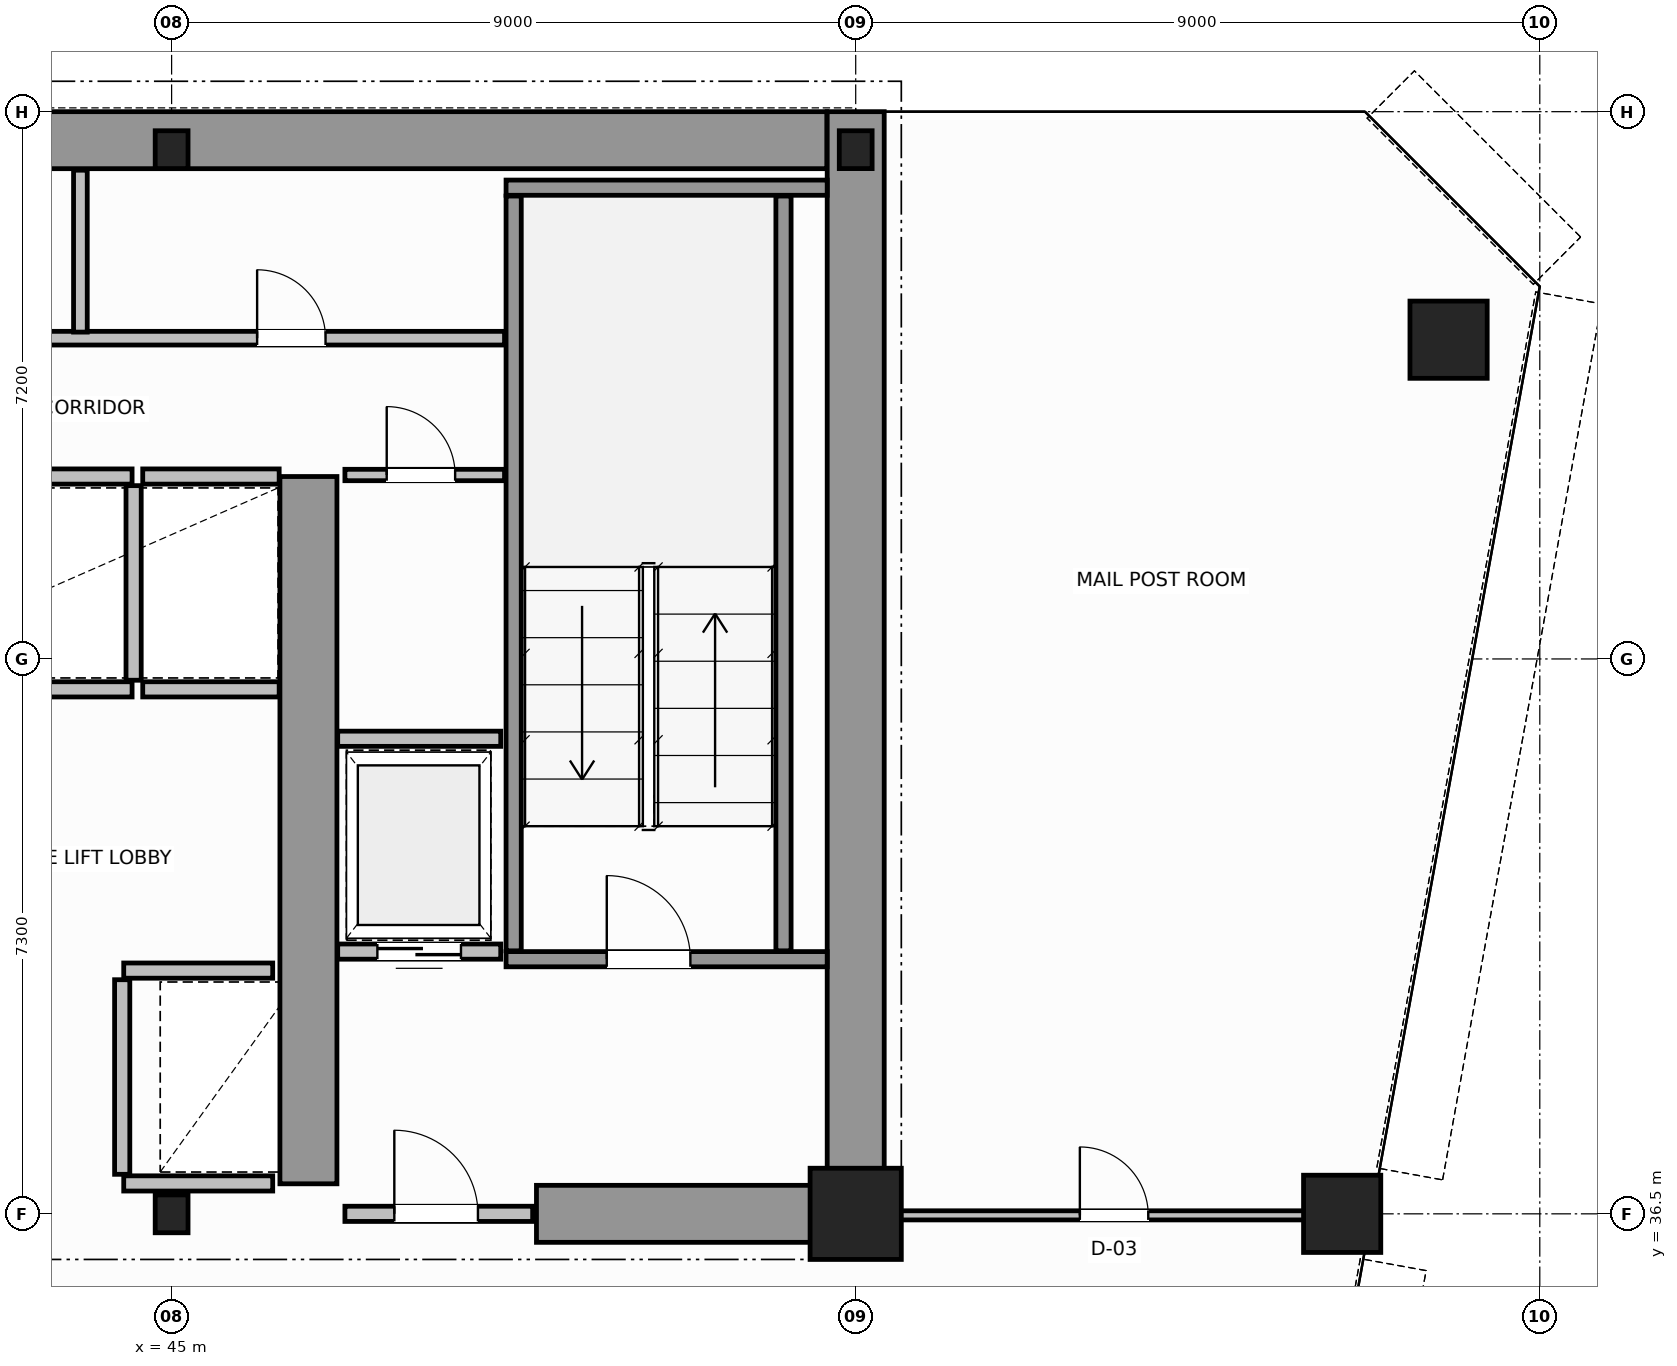
"""IFC4 building model, lengths in metres.
Left out: names, types, materials, properties, quantities, classifications, styles, units other than length and angle.
Written with IfcOpenShell. Run it as: python <this file> out.ifc"""

import sys

from ifc_helpers import new_model, si_unit, direction, frame, frame_2d, origin, origin_2d, place, context, subcontext, project, spatial, rectangle, hollow_circle, i_section, extrude, source, transform, mapped, element, fill, save


model = new_model("IFC4")
c1 = context("Model", 3, precision=1e-05, world=origin(), true_north=direction((0.0, 1.0)))
c2 = subcontext(c1, "Body", "Model", "MODEL_VIEW")
j1 = project(units=[si_unit("LENGTHUNIT", "METRE"), si_unit("PLANEANGLEUNIT", "RADIAN")], contexts=[c1])
p1 = place(None, origin())
s1 = spatial("IfcSite", under=j1, at=p1, CompositionType="ELEMENT")
p2 = place(p1, origin())
s2 = spatial("IfcBuilding", under=s1, at=p2, CompositionType="ELEMENT")
p3 = place(p2, frame((0.0, 0.0, 141.4)))
s3 = spatial("IfcBuildingStorey", under=s2, at=p3, CompositionType="ELEMENT", Elevation=141.4)
m1 = source(origin(), c2, "Body", "SweptSolid", [
    extrude(i_section(OverallWidth=0.432, OverallDepth=0.498, WebThickness=0.055, FlangeThickness=0.068, FilletRadius=0.015, at=origin_2d()), origin(), (0.0, 0.0, 1.0), 3.8),
])
p4 = place(p3, frame((45.0, 36.5, 0.0), z_axis=(0.0, 0.0, 1.0), x_axis=(1.0, 0.0, 0.0)))
e1 = element("IfcColumn", 1, at=p4, inside=s3, PredefinedType="COLUMN", context=c2, shape_type="MappedRepresentation", body=[
    mapped(m1, transform((0.0, 0.0, 0.0), scale=1.0)),
])
m2 = source(origin(), c2, "Body", "SweptSolid", [
    extrude(rectangle(XDim=1.2, YDim=1.2, at=origin_2d()), origin(), (0.0, 0.0, 1.0), 3.8),
])
p5 = place(p3, frame((54.0, 36.5, 0.0), z_axis=(0.0, 0.0, 1.0), x_axis=(1.0, 0.0, 0.0)))
e2 = element("IfcColumn", 2, at=p5, inside=s3, PredefinedType="COLUMN", context=c2, shape_type="MappedRepresentation", body=[
    mapped(m2, transform((0.0, 0.0, 0.0), scale=1.0)),
])
for number, where, z_axis, x_axis in (
    (3, (45.0, 50.5, 0.0), (0.0, 0.0, 1.0), (1.0, 0.0, 0.0)),
    (4, (54.0, 50.5, 0.0), (0.0, 0.0, 1.0), (1.0, 0.0, 0.0)),
):
    element("IfcColumn", number, at=place(p3, frame(where, z_axis=z_axis, x_axis=x_axis)), inside=s3, PredefinedType="COLUMN", context=c2, shape_type="MappedRepresentation", body=[
        mapped(m1, transform((0.0, 0.0, 0.0), scale=1.0)),
    ])
m3 = source(origin(), c2, "Body", "SweptSolid", [
    extrude(hollow_circle(Radius=0.508, WallThickness=0.045, at=origin_2d()), origin(), (0.0, 0.0, 1.0), 3.8),
])
for number, where, z_axis, x_axis in (
    (5, (61.8, 48.0, 0.0), (0.0, 0.0, 1.0), (1.0, 0.0, 0.0)),
    (6, (60.4, 36.5, 0.0), (0.0, 0.0, 1.0), (1.0, 0.0, 0.0)),
):
    element("IfcColumn", number, at=place(p3, frame(where, z_axis=z_axis, x_axis=x_axis)), inside=s3, PredefinedType="COLUMN", context=c2, shape_type="MappedRepresentation", body=[
        mapped(m3, transform((0.0, 0.0, 0.0), scale=1.0)),
    ])
p6 = place(p3, frame((34.002, 50.625, 0.0), z_axis=(0.0, 0.0, 1.0), x_axis=(1.0, 0.0, 0.0)))
e7 = element("IfcWall", 7, at=p6, inside=s3, PredefinedType="SHEAR", context=c2, shape_type="SweptSolid", body=[
    extrude(rectangle(XDim=19.619, YDim=0.75, at=frame_2d((9.81, 0.0))), origin(), (0.0, 0.0, 1.0), 3.8),
])
p7 = place(p3, frame((54.0, 36.5, 0.0), z_axis=(0.0, 0.0, 1.0), x_axis=(0.0, 1.0, 0.0)))
e8 = element("IfcWall", 8, at=p7, inside=s3, PredefinedType="SHEAR", context=c2, shape_type="SweptSolid", body=[
    extrude(rectangle(XDim=14.5, YDim=0.75, at=frame_2d((7.25, 0.0))), origin(), (0.0, 0.0, 1.0), 3.8),
])
p8 = place(p3, frame((49.8, 36.5, 0.0), z_axis=(0.0, 0.0, 1.0), x_axis=(1.0, 0.0, 0.0)))
e9 = element("IfcWall", 9, at=p8, inside=s3, PredefinedType="SHEAR", context=c2, shape_type="SweptSolid", body=[
    extrude(rectangle(XDim=3.805, YDim=0.75, at=frame_2d((1.902, 0.0))), origin(), (0.0, 0.0, 1.0), 2.38),
])
p9 = place(p3, frame((46.8, 36.895, 0.0), z_axis=(0.0, 0.0, 1.0), x_axis=(0.0, 1.0, 0.0)))
e10 = element("IfcWall", 10, at=p9, inside=s3, PredefinedType="SHEAR", context=c2, shape_type="SweptSolid", body=[
    extrude(rectangle(XDim=9.305, YDim=0.75, at=frame_2d((4.652, 0.0))), origin(), (0.0, 0.0, 1.0), 3.8),
])
p10 = place(p3, frame((49.4, 39.85, 0.0), z_axis=(0.0, 0.0, 1.0), x_axis=(1.0, 0.0, 0.0)))
e11 = element("IfcWall", 11, at=p10, inside=s3, PredefinedType="SOLIDWALL", context=c2, shape_type="SweptSolid", body=[
    extrude(rectangle(XDim=4.225, YDim=0.2, at=frame_2d((2.113, 0.0))), origin(), (0.0, 0.0, 1.0), 3.8),
])
p11 = place(p10, frame((1.325, 0.0, 0.0)))
e12 = element("IfcOpeningElement", 12, at=p11, cuts=e11, PredefinedType="OPENING", context=c2, shape_type="SweptSolid", body=[
    extrude(rectangle(XDim=1.1, YDim=2.15, at=frame_2d((0.55, 1.075))), frame((0.0, 0.11, 0.0), z_axis=(0.0, -1.0, 0.0), x_axis=(1.0, 0.0, 0.0)), (0.0, 0.0, 1.0), 0.22),
])
p12 = place(p3, frame((49.4, 50.0, 0.0), z_axis=(0.0, 0.0, 1.0), x_axis=(1.0, 0.0, 0.0)))
e13 = element("IfcWall", 13, at=p12, inside=s3, PredefinedType="SOLIDWALL", context=c2, shape_type="SweptSolid", body=[
    extrude(rectangle(XDim=4.225, YDim=0.2, at=frame_2d((2.113, 0.0))), origin(), (0.0, 0.0, 1.0), 3.8),
])
for number, where, z_axis, x_axis in (
    (14, (49.5, 39.96, 0.0), (0.0, 0.0, 1.0), (0.0, 1.0, 0.0)),
    (15, (53.05, 39.96, 0.0), (0.0, 0.0, 1.0), (0.0, 1.0, 0.0)),
):
    element("IfcWall", number, at=place(p3, frame(where, z_axis=z_axis, x_axis=x_axis)), inside=s3, PredefinedType="SOLIDWALL", context=c2, shape_type="SweptSolid", body=[
        extrude(rectangle(XDim=9.93, YDim=0.2, at=frame_2d((4.965, 0.0))), origin(), (0.0, 0.0, 1.0), 3.8),
    ])
p13 = place(p3, frame((47.28, 36.5, 0.0), z_axis=(0.0, 0.0, 1.0), x_axis=(1.0, 0.0, 0.0)))
e16 = element("IfcWall", 16, at=p13, inside=s3, PredefinedType="SOLIDWALL", context=c2, shape_type="SweptSolid", body=[
    extrude(rectangle(XDim=2.47, YDim=0.2, at=frame_2d((1.235, 0.0))), origin(), (0.0, 0.0, 1.0), 2.37),
])
p14 = place(p13, frame((0.65, 0.0, 0.0)))
e17 = element("IfcOpeningElement", 17, at=p14, cuts=e16, PredefinedType="OPENING", context=c2, shape_type="SweptSolid", body=[
    extrude(rectangle(XDim=1.1, YDim=2.15, at=frame_2d((0.55, 1.075))), frame((0.0, 0.11, 0.0), z_axis=(0.0, -1.0, 0.0), x_axis=(1.0, 0.0, 0.0)), (0.0, 0.0, 1.0), 0.22),
])
p15 = place(p3, frame((44.37, 39.7, 0.0), z_axis=(0.0, 0.0, 1.0), x_axis=(1.0, 0.0, 0.0)))
e18 = element("IfcWall", 18, at=p15, inside=s3, PredefinedType="SOLIDWALL", context=c2, shape_type="SweptSolid", body=[
    extrude(rectangle(XDim=1.96, YDim=0.2, at=frame_2d((0.98, 0.0))), origin(), (0.0, 0.0, 1.0), 3.58),
])
p16 = place(p3, frame((44.37, 36.9, 0.0), z_axis=(0.0, 0.0, 1.0), x_axis=(1.0, 0.0, 0.0)))
e19 = element("IfcWall", 19, at=p16, inside=s3, PredefinedType="SOLIDWALL", context=c2, shape_type="SweptSolid", body=[
    extrude(rectangle(XDim=1.96, YDim=0.2, at=frame_2d((0.98, 0.0))), origin(), (0.0, 0.0, 1.0), 2.37),
])
p17 = place(p3, frame((44.35, 37.02, 0.0), z_axis=(0.0, 0.0, 1.0), x_axis=(0.0, 1.0, 0.0)))
e20 = element("IfcWall", 20, at=p17, inside=s3, PredefinedType="SOLIDWALL", context=c2, shape_type="SweptSolid", body=[
    extrude(rectangle(XDim=2.56, YDim=0.2, at=frame_2d((1.28, 0.0))), origin(), (0.0, 0.0, 1.0), 3.58),
])
for number, where, z_axis, x_axis in (
    (21, (42.62, 43.4, 0.0), (0.0, 0.0, 1.0), (1.0, 0.0, 0.0)),
    (22, (42.62, 46.2, 0.0), (0.0, 0.0, 1.0), (1.0, 0.0, 0.0)),
):
    element("IfcWall", number, at=place(p3, frame(where, z_axis=z_axis, x_axis=x_axis)), inside=s3, PredefinedType="SOLIDWALL", context=c2, shape_type="SweptSolid", body=[
        extrude(rectangle(XDim=1.86, YDim=0.2, at=frame_2d((0.93, 0.0))), origin(), (0.0, 0.0, 1.0), 3.58),
    ])
p18 = place(p3, frame((44.5, 43.52, 0.0), z_axis=(0.0, 0.0, 1.0), x_axis=(0.0, 1.0, 0.0)))
e23 = element("IfcWall", 23, at=p18, inside=s3, PredefinedType="SOLIDWALL", context=c2, shape_type="SweptSolid", body=[
    extrude(rectangle(XDim=2.56, YDim=0.2, at=frame_2d((1.28, 0.0))), origin(), (0.0, 0.0, 1.0), 3.58),
])
for number, where, z_axis, x_axis in (
    (24, (44.62, 43.4, 0.0), (0.0, 0.0, 1.0), (1.0, 0.0, 0.0)),
    (25, (44.62, 46.2, 0.0), (0.0, 0.0, 1.0), (1.0, 0.0, 0.0)),
):
    element("IfcWall", number, at=place(p3, frame(where, z_axis=z_axis, x_axis=x_axis)), inside=s3, PredefinedType="SOLIDWALL", context=c2, shape_type="SweptSolid", body=[
        extrude(rectangle(XDim=1.795, YDim=0.2, at=frame_2d((0.897, 0.0))), origin(), (0.0, 0.0, 1.0), 3.58),
    ])
p19 = place(p3, frame((47.185, 39.95, 0.0), z_axis=(0.0, 0.0, 1.0), x_axis=(1.0, 0.0, 0.0)))
e26 = element("IfcWall", 26, at=p19, inside=s3, PredefinedType="SOLIDWALL", context=c2, shape_type="SweptSolid", body=[
    extrude(rectangle(XDim=2.145, YDim=0.2, at=frame_2d((1.073, 0.0))), origin(), (0.0, 0.0, 1.0), 3.58),
])
p20 = place(p19, frame((0.522, 0.0, 0.0)))
e27 = element("IfcOpeningElement", 27, at=p20, cuts=e26, PredefinedType="OPENING", context=c2, shape_type="SweptSolid", body=[
    extrude(rectangle(XDim=1.1, YDim=2.15, at=frame_2d((0.55, 1.075))), frame((0.0, 0.11, 0.0), z_axis=(0.0, -1.0, 0.0), x_axis=(1.0, 0.0, 0.0)), (0.0, 0.0, 1.0), 0.22),
])
p21 = place(p3, frame((47.185, 42.75, 0.0), z_axis=(0.0, 0.0, 1.0), x_axis=(1.0, 0.0, 0.0)))
e28 = element("IfcWall", 28, at=p21, inside=s3, PredefinedType="SOLIDWALL", context=c2, shape_type="SweptSolid", body=[
    extrude(rectangle(XDim=2.145, YDim=0.2, at=frame_2d((1.073, 0.0))), origin(), (0.0, 0.0, 1.0), 3.58),
])
p22 = place(p3, frame((47.28, 46.22, 0.0), z_axis=(0.0, 0.0, 1.0), x_axis=(1.0, 0.0, 0.0)))
e29 = element("IfcWall", 29, at=p22, inside=s3, PredefinedType="PARTITIONING", context=c2, shape_type="SweptSolid", body=[
    extrude(rectangle(XDim=2.1, YDim=0.15, at=frame_2d((1.05, 0.0))), origin(), (0.0, 0.0, 1.0), 3.58),
])
p23 = place(p22, frame((0.55, 0.0, 0.0)))
e30 = element("IfcOpeningElement", 30, at=p23, cuts=e29, PredefinedType="OPENING", context=c2, shape_type="SweptSolid", body=[
    extrude(rectangle(XDim=0.9, YDim=2.1, at=frame_2d((0.45, 1.05))), frame((0.0, 0.085, 0.0), z_axis=(0.0, -1.0, 0.0), x_axis=(1.0, 0.0, 0.0)), (0.0, 0.0, 1.0), 0.17),
])
p24 = place(p3, frame((18.62, 48.02, 0.0), z_axis=(0.0, 0.0, 1.0), x_axis=(1.0, 0.0, 0.0)))
e31 = element("IfcWall", 31, at=p24, inside=s3, PredefinedType="PLUMBINGWALL", context=c2, shape_type="SweptSolid", body=[
    extrude(rectangle(XDim=30.76, YDim=0.18, at=frame_2d((15.38, 0.0))), origin(), (0.0, 0.0, 1.0), 3.58),
])
p25 = place(p24, frame((1.655, 0.0, 0.0)))
e32 = element("IfcOpeningElement", 32, at=p25, cuts=e31, PredefinedType="OPENING", context=c2, shape_type="SweptSolid", body=[
    extrude(rectangle(XDim=0.9, YDim=2.15, at=frame_2d((0.45, 1.075))), frame((0.0, 0.1, 0.0), z_axis=(0.0, -1.0, 0.0), x_axis=(1.0, 0.0, 0.0)), (0.0, 0.0, 1.0), 0.2),
])
p26 = place(p24, frame((6.03, 0.0, 0.0)))
e33 = element("IfcOpeningElement", 33, at=p26, cuts=e31, PredefinedType="OPENING", context=c2, shape_type="SweptSolid", body=[
    extrude(rectangle(XDim=0.9, YDim=2.15, at=frame_2d((0.45, 1.075))), frame((0.0, 0.1, 0.0), z_axis=(0.0, -1.0, 0.0), x_axis=(1.0, 0.0, 0.0)), (0.0, 0.0, 1.0), 0.2),
])
p27 = place(p24, frame((10.93, 0.0, 0.0)))
e34 = element("IfcOpeningElement", 34, at=p27, cuts=e31, PredefinedType="OPENING", context=c2, shape_type="SweptSolid", body=[
    extrude(rectangle(XDim=0.9, YDim=2.15, at=frame_2d((0.45, 1.075))), frame((0.0, 0.1, 0.0), z_axis=(0.0, -1.0, 0.0), x_axis=(1.0, 0.0, 0.0)), (0.0, 0.0, 1.0), 0.2),
])
p28 = place(p24, frame((16.13, 0.0, 0.0)))
e35 = element("IfcOpeningElement", 35, at=p28, cuts=e31, PredefinedType="OPENING", context=c2, shape_type="SweptSolid", body=[
    extrude(rectangle(XDim=0.9, YDim=2.15, at=frame_2d((0.45, 1.075))), frame((0.0, 0.1, 0.0), z_axis=(0.0, -1.0, 0.0), x_axis=(1.0, 0.0, 0.0)), (0.0, 0.0, 1.0), 0.2),
])
p29 = place(p24, frame((21.73, 0.0, 0.0)))
e36 = element("IfcOpeningElement", 36, at=p29, cuts=e31, PredefinedType="OPENING", context=c2, shape_type="SweptSolid", body=[
    extrude(rectangle(XDim=0.9, YDim=2.15, at=frame_2d((0.45, 1.075))), frame((0.0, 0.1, 0.0), z_axis=(0.0, -1.0, 0.0), x_axis=(1.0, 0.0, 0.0)), (0.0, 0.0, 1.0), 0.2),
])
p30 = place(p24, frame((27.505, 0.0, 0.0)))
e37 = element("IfcOpeningElement", 37, at=p30, cuts=e31, PredefinedType="OPENING", context=c2, shape_type="SweptSolid", body=[
    extrude(rectangle(XDim=0.9, YDim=2.15, at=frame_2d((0.45, 1.075))), frame((0.0, 0.1, 0.0), z_axis=(0.0, -1.0, 0.0), x_axis=(1.0, 0.0, 0.0)), (0.0, 0.0, 1.0), 0.2),
])
p31 = place(p3, frame((43.8, 48.1, 0.0), z_axis=(0.0, 0.0, 1.0), x_axis=(0.0, 1.0, 0.0)))
e38 = element("IfcWall", 38, at=p31, inside=s3, PredefinedType="PLUMBINGWALL", context=c2, shape_type="SweptSolid", body=[
    extrude(rectangle(XDim=2.13, YDim=0.18, at=frame_2d((1.065, 0.0))), origin(), (0.0, 0.0, 1.0), 3.58),
])
p32 = place(p3, frame((54.06, 36.48, 0.0), z_axis=(0.0, 0.0, 1.0), x_axis=(1.0, 0.0, 0.0)))
e39 = element("IfcWall", 39, at=p32, inside=s3, PredefinedType="PARTITIONING", context=c2, shape_type="SweptSolid", body=[
    extrude(rectangle(XDim=6.677, YDim=0.12, at=frame_2d((3.339, 0.0))), origin(), (0.0, 0.0, 1.0), 2.87),
])
p33 = place(p32, frame((2.889, 0.0, 0.0)))
e40 = element("IfcOpeningElement", 40, at=p33, cuts=e39, PredefinedType="OPENING", context=c2, shape_type="SweptSolid", body=[
    extrude(rectangle(XDim=0.9, YDim=2.15, at=frame_2d((0.45, 1.075))), frame((0.0, 0.07, 0.0), z_axis=(0.0, -1.0, 0.0), x_axis=(1.0, 0.0, 0.0)), (0.0, 0.0, 1.0), 0.14),
])
m4 = source(origin(), c2, "Body", "SweptSolid", [
    extrude(rectangle(XDim=1.1, YDim=2.15, at=frame_2d((0.55, 1.075))), frame((0.0, 0.025, 0.0), z_axis=(0.0, -1.0, 0.0), x_axis=(1.0, 0.0, 0.0)), (0.0, 0.0, 1.0), 0.05),
])
p34 = place(p11, origin())
e41 = element("IfcDoor", 41, at=p34, inside=s3, OperationType="SINGLE_SWING_RIGHT", PredefinedType="DOOR", context=c2, shape_type="MappedRepresentation", body=[
    mapped(m4, transform((0.0, 0.0, 0.0), scale=1.0)),
])
fill(e12, e41)
p35 = place(p14, origin())
e42 = element("IfcDoor", 42, at=p35, inside=s3, OperationType="SINGLE_SWING_LEFT", PredefinedType="DOOR", context=c2, shape_type="MappedRepresentation", body=[
    mapped(m4, transform((0.0, 0.0, 0.0), scale=1.0)),
])
fill(e17, e42)
p36 = place(p20, origin())
e43 = element("IfcDoor", 43, at=p36, inside=s3, OperationType="DOUBLE_DOOR_SLIDING", PredefinedType="DOOR", context=c2, shape_type="MappedRepresentation", body=[
    mapped(m4, transform((0.0, 0.0, 0.0), scale=1.0)),
])
fill(e27, e43)
m5 = source(origin(), c2, "Body", "SweptSolid", [
    extrude(rectangle(XDim=0.9, YDim=2.1, at=frame_2d((0.45, 1.05))), frame((0.0, 0.025, 0.0), z_axis=(0.0, -1.0, 0.0), x_axis=(1.0, 0.0, 0.0)), (0.0, 0.0, 1.0), 0.05),
])
p37 = place(p23, origin())
e44 = element("IfcDoor", 44, at=p37, inside=s3, OperationType="SINGLE_SWING_RIGHT", PredefinedType="DOOR", context=c2, shape_type="MappedRepresentation", body=[
    mapped(m5, transform((0.0, 0.0, 0.0), scale=1.0)),
])
fill(e30, e44)
m6 = source(origin(), c2, "Body", "SweptSolid", [
    extrude(rectangle(XDim=0.9, YDim=2.15, at=frame_2d((0.45, 1.075))), frame((0.0, 0.025, 0.0), z_axis=(0.0, -1.0, 0.0), x_axis=(1.0, 0.0, 0.0)), (0.0, 0.0, 1.0), 0.05),
])
p38 = place(p30, origin())
e45 = element("IfcDoor", 45, at=p38, inside=s3, OperationType="SINGLE_SWING_RIGHT", PredefinedType="DOOR", context=c2, shape_type="MappedRepresentation", body=[
    mapped(m6, transform((0.0, 0.0, 0.0), scale=1.0)),
])
fill(e37, e45)
p39 = place(p33, origin())
e46 = element("IfcDoor", 46, at=p39, inside=s3, OperationType="SINGLE_SWING_RIGHT", PredefinedType="DOOR", context=c2, shape_type="MappedRepresentation", body=[
    mapped(m6, transform((0.0, 0.0, 0.0), scale=1.0)),
])
fill(e40, e46)
save(model, sys.argv[1])
